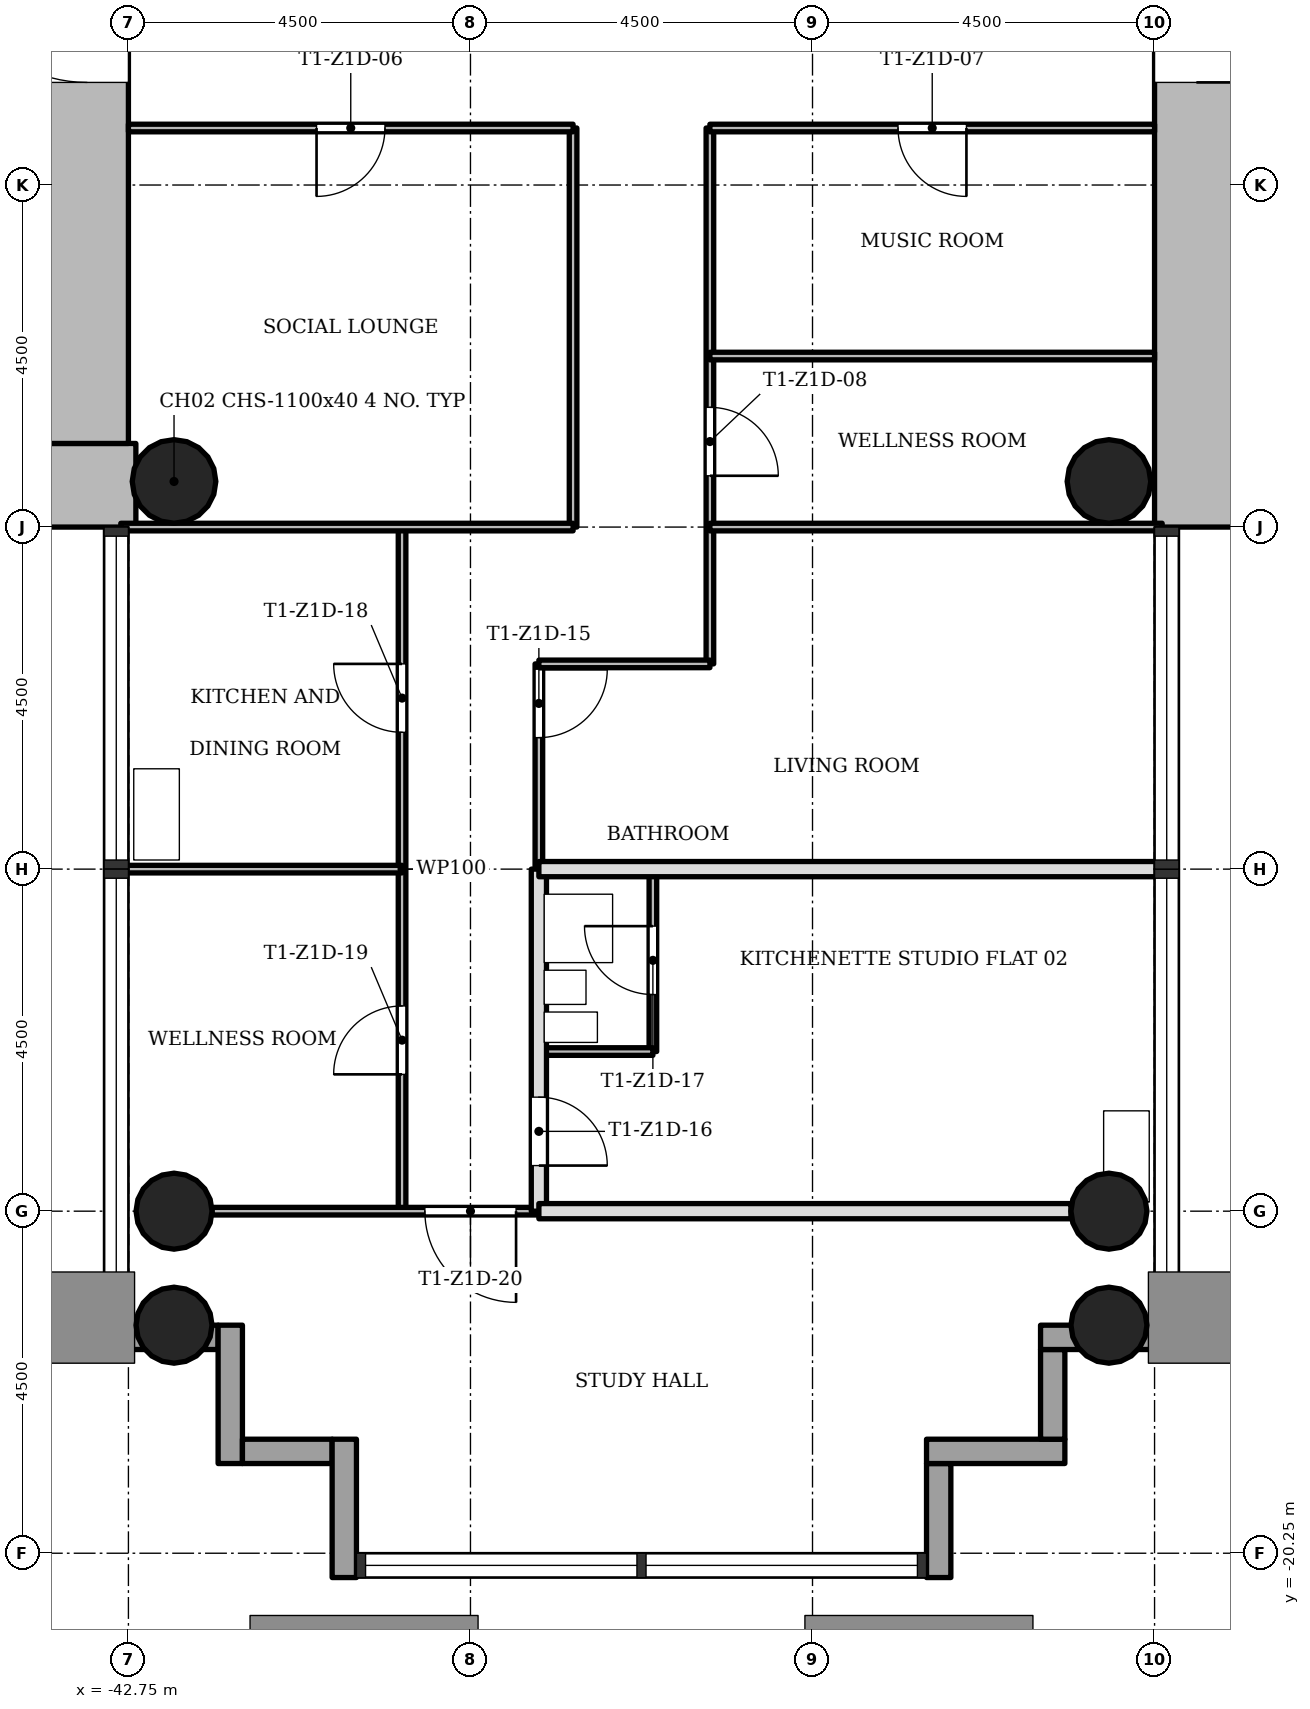
"""IFC4 building model, lengths in metres.
Left out: names, types, materials, properties, quantities, classifications, styles, units other than length and angle.
Written with IfcOpenShell. Run it as: python <this file> out.ifc"""

import sys

from ifc_helpers import new_model, si_unit, direction, frame, frame_2d, origin, origin_2d, place, context, subcontext, project, spatial, rectangle, hollow_circle, extrude, element, fill, save


model = new_model("IFC4")
c1 = context("Model", 3, precision=1e-05, world=origin(), true_north=direction((0.0, 1.0)))
c2 = subcontext(c1, "Body", "Model", "MODEL_VIEW")
j1 = project(units=[si_unit("LENGTHUNIT", "METRE"), si_unit("PLANEANGLEUNIT", "RADIAN")], contexts=[c1])
p1 = place(None, origin())
s1 = spatial("IfcSite", under=j1, at=p1, CompositionType="ELEMENT")
p2 = place(p1, origin())
s2 = spatial("IfcBuilding", under=s1, at=p2, CompositionType="ELEMENT")
p3 = place(p2, frame((0.0, 0.0, 58.5)))
s3 = spatial("IfcBuildingStorey", under=s2, at=p3, CompositionType="ELEMENT", Elevation=58.5)
p4 = place(p3, frame((-28.7, 5.65, 0.0), z_axis=(0.0, 0.0, 1.0), x_axis=(0.0, -1.0, 0.0)))
e1 = element("IfcWall", 1, at=p4, inside=s3, PredefinedType="SHEAR", context=c2, shape_type="SweptSolid", body=[
    extrude(rectangle(XDim=12.4, YDim=1.1, at=frame_2d((6.2, 0.0))), origin(), (0.0, 0.0, 1.0), 3.4),
])
p5 = place(p4, frame((4.75, 0.0, 0.0)))
e2 = element("IfcOpeningElement", 2, at=p5, cuts=e1, PredefinedType="OPENING", context=c2, shape_type="SweptSolid", body=[
    extrude(rectangle(XDim=1.8, YDim=2.1, at=frame_2d((0.9, 1.05))), frame((0.0, 0.56, 0.0), z_axis=(0.0, -1.0, 0.0), x_axis=(1.0, 0.0, 0.0)), (0.0, 0.0, 1.0), 1.12),
])
p6 = place(p3, frame((-50.65, -6.2, 0.0), z_axis=(0.0, 0.0, 1.0), x_axis=(1.0, 0.0, 0.0)))
e3 = element("IfcWall", 3, at=p6, inside=s3, PredefinedType="SHEAR", context=c2, shape_type="SweptSolid", body=[
    extrude(rectangle(XDim=7.998, YDim=1.1, at=frame_2d((3.999, 0.0))), origin(), (0.0, 0.0, 1.0), 3.4),
])
p7 = place(p3, frame((-43.3, -5.65, 0.0), z_axis=(0.0, 0.0, 1.0), x_axis=(0.0, 1.0, 0.0)))
e4 = element("IfcWall", 4, at=p7, inside=s3, PredefinedType="SHEAR", context=c2, shape_type="SweptSolid", body=[
    extrude(rectangle(XDim=12.4, YDim=1.1, at=frame_2d((6.2, 0.0))), origin(), (0.0, 0.0, 1.0), 3.4),
])
p8 = place(p7, frame((4.75, 0.0, 0.0)))
e5 = element("IfcOpeningElement", 5, at=p8, cuts=e4, PredefinedType="OPENING", context=c2, shape_type="SweptSolid", body=[
    extrude(rectangle(XDim=1.8, YDim=2.1, at=frame_2d((0.9, 1.05))), frame((0.0, 0.56, 0.0), z_axis=(0.0, -1.0, 0.0), x_axis=(1.0, 0.0, 0.0)), (0.0, 0.0, 1.0), 1.12),
])
for number, where, z_axis, x_axis in (
    (6, (-42.15, -15.75, 0.0), (0.0, 0.0, 1.0), (1.0, 0.0, 0.0)),
    (7, (-29.85, -15.75, 0.0), (0.0, 0.0, 1.0), (1.0, 0.0, 0.0)),
    (8, (-42.15, -17.25, 0.0), (0.0, 0.0, 1.0), (1.0, 0.0, 0.0)),
    (9, (-29.85, -17.25, 0.0), (0.0, 0.0, 1.0), (1.0, 0.0, 0.0)),
):
    element("IfcColumn", number, at=place(p3, frame(where, z_axis=z_axis, x_axis=x_axis)), inside=s3, PredefinedType="COLUMN", context=c2, shape_type="SweptSolid", body=[
        extrude(hollow_circle(Radius=0.5, WallThickness=0.036, at=origin_2d()), origin(), (0.0, 0.0, 1.0), 3.4),
    ])
for number, where, z_axis, x_axis in (
    (10, (-42.15, -6.15, 0.0), (0.0, 0.0, 1.0), (1.0, 0.0, 0.0)),
    (11, (-29.85, -6.15, 0.0), (0.0, 0.0, 1.0), (1.0, 0.0, 0.0)),
):
    element("IfcColumn", number, at=place(p3, frame(where, z_axis=z_axis, x_axis=x_axis)), inside=s3, PredefinedType="COLUMN", context=c2, shape_type="SweptSolid", body=[
        extrude(hollow_circle(Radius=0.55, WallThickness=0.04, at=origin_2d()), origin(), (0.0, 0.0, 1.0), 3.4),
    ])
p9 = place(p3, frame((-43.07, -17.41, -0.3), z_axis=(0.0, 0.0, 1.0), x_axis=(1.0, 0.0, 0.0)))
e12 = element("IfcWall", 12, at=p9, inside=s3, PredefinedType="STANDARD", context=c2, shape_type="SweptSolid", body=[
    extrude(rectangle(XDim=1.5, YDim=0.32, at=frame_2d((0.75, 0.0))), origin(), (0.0, 0.0, 1.0), 3.4),
])
p10 = place(p3, frame((-41.41, -17.25, -0.3), z_axis=(0.0, 0.0, 1.0), x_axis=(0.0, -1.0, 0.0)))
e13 = element("IfcWall", 13, at=p10, inside=s3, PredefinedType="STANDARD", context=c2, shape_type="SweptSolid", body=[
    extrude(rectangle(XDim=1.82, YDim=0.32, at=frame_2d((0.91, 0.0))), origin(), (0.0, 0.0, 1.0), 3.4),
])
p11 = place(p3, frame((-41.25, -18.91, -0.3), z_axis=(0.0, 0.0, 1.0), x_axis=(1.0, 0.0, 0.0)))
e14 = element("IfcWall", 14, at=p11, inside=s3, PredefinedType="STANDARD", context=c2, shape_type="SweptSolid", body=[
    extrude(rectangle(XDim=1.18, YDim=0.32, at=frame_2d((0.59, 0.0))), origin(), (0.0, 0.0, 1.0), 3.4),
])
p12 = place(p3, frame((-39.91, -18.75, -0.3), z_axis=(0.0, 0.0, 1.0), x_axis=(0.0, -1.0, 0.0)))
e15 = element("IfcWall", 15, at=p12, inside=s3, PredefinedType="STANDARD", context=c2, shape_type="SweptSolid", body=[
    extrude(rectangle(XDim=1.82, YDim=0.32, at=frame_2d((0.91, 0.0))), origin(), (0.0, 0.0, 1.0), 3.4),
])
p13 = place(p3, frame((-32.09, -20.57, -0.3), z_axis=(0.0, 0.0, 1.0), x_axis=(0.0, 1.0, 0.0)))
e16 = element("IfcWall", 16, at=p13, inside=s3, PredefinedType="STANDARD", context=c2, shape_type="SweptSolid", body=[
    extrude(rectangle(XDim=1.5, YDim=0.32, at=frame_2d((0.75, 0.0))), origin(), (0.0, 0.0, 1.0), 3.4),
])
p14 = place(p3, frame((-32.25, -18.91, -0.3), z_axis=(0.0, 0.0, 1.0), x_axis=(1.0, 0.0, 0.0)))
e17 = element("IfcWall", 17, at=p14, inside=s3, PredefinedType="STANDARD", context=c2, shape_type="SweptSolid", body=[
    extrude(rectangle(XDim=1.82, YDim=0.32, at=frame_2d((0.91, 0.0))), origin(), (0.0, 0.0, 1.0), 3.4),
])
p15 = place(p3, frame((-30.59, -18.75, -0.3), z_axis=(0.0, 0.0, 1.0), x_axis=(0.0, 1.0, 0.0)))
e18 = element("IfcWall", 18, at=p15, inside=s3, PredefinedType="STANDARD", context=c2, shape_type="SweptSolid", body=[
    extrude(rectangle(XDim=1.18, YDim=0.32, at=frame_2d((0.59, 0.0))), origin(), (0.0, 0.0, 1.0), 3.4),
])
p16 = place(p3, frame((-30.75, -17.41, -0.3), z_axis=(0.0, 0.0, 1.0), x_axis=(1.0, 0.0, 0.0)))
e19 = element("IfcWall", 19, at=p16, inside=s3, PredefinedType="STANDARD", context=c2, shape_type="SweptSolid", body=[
    extrude(rectangle(XDim=1.82, YDim=0.32, at=frame_2d((0.91, 0.0))), origin(), (0.0, 0.0, 1.0), 3.4),
])
p17 = place(p3, frame((-39.15, -15.75, 0.0), z_axis=(0.0, 0.0, 1.0), x_axis=(0.0, 1.0, 0.0)))
e20 = element("IfcWall", 20, at=p17, inside=s3, PredefinedType="PARTITIONING", context=c2, shape_type="SweptSolid", body=[
    extrude(rectangle(XDim=9.0, YDim=0.1, at=frame_2d((4.5, 0.0))), origin(), (0.0, 0.0, 1.0), 3.0),
])
p18 = place(p17, frame((6.3, 0.0, 0.0)))
e21 = element("IfcOpeningElement", 21, at=p18, cuts=e20, PredefinedType="OPENING", context=c2, shape_type="SweptSolid", body=[
    extrude(rectangle(XDim=0.9, YDim=2.1, at=frame_2d((0.45, 1.05))), frame((0.0, 0.06, 0.0), z_axis=(0.0, -1.0, 0.0), x_axis=(1.0, 0.0, 0.0)), (0.0, 0.0, 1.0), 0.12),
])
p19 = place(p17, frame((1.8, 0.0, 0.0)))
e22 = element("IfcOpeningElement", 22, at=p19, cuts=e20, PredefinedType="OPENING", context=c2, shape_type="SweptSolid", body=[
    extrude(rectangle(XDim=0.9, YDim=2.1, at=frame_2d((0.45, 1.05))), frame((0.0, 0.06, 0.0), z_axis=(0.0, -1.0, 0.0), x_axis=(1.0, 0.0, 0.0)), (0.0, 0.0, 1.0), 0.12),
])
p20 = place(p3, frame((-37.35, -11.25, 0.0), z_axis=(0.0, 0.0, 1.0), x_axis=(0.0, 1.0, 0.0)))
e23 = element("IfcWall", 23, at=p20, inside=s3, PredefinedType="PARTITIONING", context=c2, shape_type="SweptSolid", body=[
    extrude(rectangle(XDim=2.7, YDim=0.1, at=frame_2d((1.35, 0.0))), origin(), (0.0, 0.0, 1.0), 3.0),
])
p21 = place(p20, frame((1.73, 0.0, 0.0)))
e24 = element("IfcOpeningElement", 24, at=p21, cuts=e23, PredefinedType="OPENING", context=c2, shape_type="SweptSolid", body=[
    extrude(rectangle(XDim=0.9, YDim=2.1, at=frame_2d((0.45, 1.05))), frame((0.0, 0.06, 0.0), z_axis=(0.0, -1.0, 0.0), x_axis=(1.0, 0.0, 0.0)), (0.0, 0.0, 1.0), 0.12),
])
p22 = place(p3, frame((-37.35, -15.75, 0.0), z_axis=(0.0, 0.0, 1.0), x_axis=(0.0, 1.0, 0.0)))
e25 = element("IfcWall", 25, at=p22, inside=s3, PredefinedType="SOLIDWALL", context=c2, shape_type="SweptSolid", body=[
    extrude(rectangle(XDim=4.5, YDim=0.2, at=frame_2d((2.25, 0.0))), origin(), (0.0, 0.0, 1.0), 3.0),
])
p23 = place(p22, frame((0.6, 0.0, 0.0)))
e26 = element("IfcOpeningElement", 26, at=p23, cuts=e25, PredefinedType="OPENING", context=c2, shape_type="SweptSolid", body=[
    extrude(rectangle(XDim=0.9, YDim=2.1, at=frame_2d((0.45, 1.05))), frame((0.0, 0.11, 0.0), z_axis=(0.0, -1.0, 0.0), x_axis=(1.0, 0.0, 0.0)), (0.0, 0.0, 1.0), 0.22),
])
p24 = place(p3, frame((-36.9, -6.75, 0.0), z_axis=(0.0, 0.0, 1.0), x_axis=(0.0, 1.0, 0.0)))
e27 = element("IfcWall", 27, at=p24, inside=s3, PredefinedType="PARTITIONING", context=c2, shape_type="SweptSolid", body=[
    extrude(rectangle(XDim=5.25, YDim=0.1, at=frame_2d((2.625, 0.0))), origin(), (0.0, 0.0, 1.0), 3.0),
])
p25 = place(p3, frame((-35.85, -13.65, 0.0), z_axis=(0.0, 0.0, 1.0), x_axis=(0.0, 1.0, 0.0)))
e28 = element("IfcWall", 28, at=p25, inside=s3, PredefinedType="PARTITIONING", context=c2, shape_type="SweptSolid", body=[
    extrude(rectangle(XDim=2.4, YDim=0.1, at=frame_2d((1.2, 0.0))), origin(), (0.0, 0.0, 1.0), 3.0),
])
p26 = place(p25, frame((0.75, 0.0, 0.0)))
e29 = element("IfcOpeningElement", 29, at=p26, cuts=e28, PredefinedType="OPENING", context=c2, shape_type="SweptSolid", body=[
    extrude(rectangle(XDim=0.9, YDim=2.1, at=frame_2d((0.45, 1.05))), frame((0.0, 0.06, 0.0), z_axis=(0.0, -1.0, 0.0), x_axis=(1.0, 0.0, 0.0)), (0.0, 0.0, 1.0), 0.12),
])
p27 = place(p3, frame((-35.1, -8.55, 0.0), z_axis=(0.0, 0.0, 1.0), x_axis=(0.0, 1.0, 0.0)))
e30 = element("IfcWall", 30, at=p27, inside=s3, PredefinedType="PARTITIONING", context=c2, shape_type="SweptSolid", body=[
    extrude(rectangle(XDim=7.05, YDim=0.1, at=frame_2d((3.525, 0.0))), origin(), (0.0, 0.0, 1.0), 3.0),
])
p28 = place(p27, frame((2.475, 0.0, 0.0)))
e31 = element("IfcOpeningElement", 31, at=p28, cuts=e30, PredefinedType="OPENING", context=c2, shape_type="SweptSolid", body=[
    extrude(rectangle(XDim=0.9, YDim=2.1, at=frame_2d((0.45, 1.05))), frame((0.0, 0.06, 0.0), z_axis=(0.0, -1.0, 0.0), x_axis=(1.0, 0.0, 0.0)), (0.0, 0.0, 1.0), 0.12),
])
p29 = place(p3, frame((-41.65, -15.75, 0.0), z_axis=(0.0, 0.0, 1.0), x_axis=(1.0, 0.0, 0.0)))
e32 = element("IfcWall", 32, at=p29, inside=s3, PredefinedType="PARTITIONING", context=c2, shape_type="SweptSolid", body=[
    extrude(rectangle(XDim=4.3, YDim=0.1, at=frame_2d((2.15, 0.0))), origin(), (0.0, 0.0, 1.0), 3.0),
])
p30 = place(p29, frame((2.8, 0.0, 0.0)))
e33 = element("IfcOpeningElement", 33, at=p30, cuts=e32, PredefinedType="OPENING", context=c2, shape_type="SweptSolid", body=[
    extrude(rectangle(XDim=1.2, YDim=2.1, at=frame_2d((0.6, 1.05))), frame((0.0, 0.06, 0.0), z_axis=(0.0, -1.0, 0.0), x_axis=(1.0, 0.0, 0.0)), (0.0, 0.0, 1.0), 0.12),
])
p31 = place(p3, frame((-37.35, -15.75, 0.0), z_axis=(0.0, 0.0, 1.0), x_axis=(1.0, 0.0, 0.0)))
e34 = element("IfcWall", 34, at=p31, inside=s3, PredefinedType="SOLIDWALL", context=c2, shape_type="SweptSolid", body=[
    extrude(rectangle(XDim=7.0, YDim=0.2, at=frame_2d((3.5, 0.0))), origin(), (0.0, 0.0, 1.0), 3.0),
])
p32 = place(p3, frame((-37.35, -13.65, 0.0), z_axis=(0.0, 0.0, 1.0), x_axis=(1.0, 0.0, 0.0)))
e35 = element("IfcWall", 35, at=p32, inside=s3, PredefinedType="PARTITIONING", context=c2, shape_type="SweptSolid", body=[
    extrude(rectangle(XDim=1.5, YDim=0.1, at=frame_2d((0.75, 0.0))), origin(), (0.0, 0.0, 1.0), 3.0),
])
p33 = place(p3, frame((-42.85, -11.25, 0.0), z_axis=(0.0, 0.0, 1.0), x_axis=(1.0, 0.0, 0.0)))
e36 = element("IfcWall", 36, at=p33, inside=s3, PredefinedType="PARTITIONING", context=c2, shape_type="SweptSolid", body=[
    extrude(rectangle(XDim=3.7, YDim=0.1, at=frame_2d((1.85, 0.0))), origin(), (0.0, 0.0, 1.0), 3.0),
])
p34 = place(p3, frame((-37.35, -11.25, 0.0), z_axis=(0.0, 0.0, 1.0), x_axis=(1.0, 0.0, 0.0)))
e37 = element("IfcWall", 37, at=p34, inside=s3, PredefinedType="SOLIDWALL", context=c2, shape_type="SweptSolid", body=[
    extrude(rectangle(XDim=8.2, YDim=0.2, at=frame_2d((4.1, 0.0))), origin(), (0.0, 0.0, 1.0), 3.0),
])
p35 = place(p3, frame((-37.35, -8.55, 0.0), z_axis=(0.0, 0.0, 1.0), x_axis=(1.0, 0.0, 0.0)))
e38 = element("IfcWall", 38, at=p35, inside=s3, PredefinedType="PARTITIONING", context=c2, shape_type="SweptSolid", body=[
    extrude(rectangle(XDim=2.25, YDim=0.1, at=frame_2d((1.125, 0.0))), origin(), (0.0, 0.0, 1.0), 3.0),
])
for number, where, z_axis, x_axis in (
    (39, (-42.85, -6.75, 0.0), (0.0, 0.0, 1.0), (1.0, 0.0, 0.0)),
    (40, (-35.1, -6.75, 0.0), (0.0, 0.0, 1.0), (1.0, 0.0, 0.0)),
):
    element("IfcWall", number, at=place(p3, frame(where, z_axis=z_axis, x_axis=x_axis)), inside=s3, PredefinedType="PARTITIONING", context=c2, shape_type="SweptSolid", body=[
        extrude(rectangle(XDim=5.95, YDim=0.1, at=frame_2d((2.975, 0.0))), origin(), (0.0, 0.0, 1.0), 3.0),
    ])
p36 = place(p3, frame((-35.1, -4.5, 0.0), z_axis=(0.0, 0.0, 1.0), x_axis=(1.0, 0.0, 0.0)))
e41 = element("IfcWall", 41, at=p36, inside=s3, PredefinedType="PARTITIONING", context=c2, shape_type="SweptSolid", body=[
    extrude(rectangle(XDim=5.85, YDim=0.1, at=frame_2d((2.925, 0.0))), origin(), (0.0, 0.0, 1.0), 3.0),
])
p37 = place(p3, frame((-42.75, -1.5, 0.0), z_axis=(0.0, 0.0, 1.0), x_axis=(1.0, 0.0, 0.0)))
e42 = element("IfcWall", 42, at=p37, inside=s3, PredefinedType="PARTITIONING", context=c2, shape_type="SweptSolid", body=[
    extrude(rectangle(XDim=5.85, YDim=0.1, at=frame_2d((2.925, 0.0))), origin(), (0.0, 0.0, 1.0), 3.0),
])
p38 = place(p37, frame((2.475, 0.0, 0.0)))
e43 = element("IfcOpeningElement", 43, at=p38, cuts=e42, PredefinedType="OPENING", context=c2, shape_type="SweptSolid", body=[
    extrude(rectangle(XDim=0.9, YDim=2.1, at=frame_2d((0.45, 1.05))), frame((0.0, 0.06, 0.0), z_axis=(0.0, -1.0, 0.0), x_axis=(1.0, 0.0, 0.0)), (0.0, 0.0, 1.0), 0.12),
])
p39 = place(p3, frame((-35.1, -1.5, 0.0), z_axis=(0.0, 0.0, 1.0), x_axis=(1.0, 0.0, 0.0)))
e44 = element("IfcWall", 44, at=p39, inside=s3, PredefinedType="PARTITIONING", context=c2, shape_type="SweptSolid", body=[
    extrude(rectangle(XDim=5.85, YDim=0.1, at=frame_2d((2.925, 0.0))), origin(), (0.0, 0.0, 1.0), 3.0),
])
p40 = place(p39, frame((2.475, 0.0, 0.0)))
e45 = element("IfcOpeningElement", 45, at=p40, cuts=e44, PredefinedType="OPENING", context=c2, shape_type="SweptSolid", body=[
    extrude(rectangle(XDim=0.9, YDim=2.1, at=frame_2d((0.45, 1.05))), frame((0.0, 0.06, 0.0), z_axis=(0.0, -1.0, 0.0), x_axis=(1.0, 0.0, 0.0)), (0.0, 0.0, 1.0), 0.12),
])
p41 = place(p38, origin())
e46 = element("IfcDoor", 46, at=p41, inside=s3, OperationType="SINGLE_SWING_LEFT", PredefinedType="DOOR", context=c2, shape_type="SweptSolid", body=[
    extrude(rectangle(XDim=0.9, YDim=2.1, at=frame_2d((0.45, 1.05))), frame((0.0, 0.025, 0.0), z_axis=(0.0, -1.0, 0.0), x_axis=(1.0, 0.0, 0.0)), (0.0, 0.0, 1.0), 0.05),
])
fill(e43, e46)
p42 = place(p40, origin())
e47 = element("IfcDoor", 47, at=p42, inside=s3, OperationType="SINGLE_SWING_RIGHT", PredefinedType="DOOR", context=c2, shape_type="SweptSolid", body=[
    extrude(rectangle(XDim=0.9, YDim=2.1, at=frame_2d((0.45, 1.05))), frame((0.0, 0.025, 0.0), z_axis=(0.0, -1.0, 0.0), x_axis=(1.0, 0.0, 0.0)), (0.0, 0.0, 1.0), 0.05),
])
fill(e45, e47)
p43 = place(p28, origin())
e48 = element("IfcDoor", 48, at=p43, inside=s3, OperationType="SINGLE_SWING_LEFT", PredefinedType="DOOR", context=c2, shape_type="SweptSolid", body=[
    extrude(rectangle(XDim=0.9, YDim=2.1, at=frame_2d((0.45, 1.05))), frame((0.0, 0.025, 0.0), z_axis=(0.0, -1.0, 0.0), x_axis=(1.0, 0.0, 0.0)), (0.0, 0.0, 1.0), 0.05),
])
fill(e31, e48)
p44 = place(p21, origin())
e49 = element("IfcDoor", 49, at=p44, inside=s3, OperationType="SINGLE_SWING_RIGHT", PredefinedType="DOOR", context=c2, shape_type="SweptSolid", body=[
    extrude(rectangle(XDim=0.9, YDim=2.1, at=frame_2d((0.45, 1.05))), frame((0.0, 0.025, 0.0), z_axis=(0.0, -1.0, 0.0), x_axis=(1.0, 0.0, 0.0)), (0.0, 0.0, 1.0), 0.05),
])
fill(e24, e49)
p45 = place(p23, origin())
e50 = element("IfcDoor", 50, at=p45, inside=s3, OperationType="SINGLE_SWING_LEFT", PredefinedType="DOOR", context=c2, shape_type="SweptSolid", body=[
    extrude(rectangle(XDim=0.9, YDim=2.1, at=frame_2d((0.45, 1.05))), frame((0.0, 0.025, 0.0), z_axis=(0.0, -1.0, 0.0), x_axis=(1.0, 0.0, 0.0)), (0.0, 0.0, 1.0), 0.05),
])
fill(e26, e50)
p46 = place(p26, origin())
e51 = element("IfcDoor", 51, at=p46, inside=s3, OperationType="SINGLE_SWING_LEFT", PredefinedType="DOOR", context=c2, shape_type="SweptSolid", body=[
    extrude(rectangle(XDim=0.9, YDim=2.1, at=frame_2d((0.45, 1.05))), frame((0.0, 0.025, 0.0), z_axis=(0.0, -1.0, 0.0), x_axis=(1.0, 0.0, 0.0)), (0.0, 0.0, 1.0), 0.05),
])
fill(e29, e51)
p47 = place(p18, origin())
e52 = element("IfcDoor", 52, at=p47, inside=s3, OperationType="SINGLE_SWING_LEFT", PredefinedType="DOOR", context=c2, shape_type="SweptSolid", body=[
    extrude(rectangle(XDim=0.9, YDim=2.1, at=frame_2d((0.45, 1.05))), frame((0.0, 0.025, 0.0), z_axis=(0.0, -1.0, 0.0), x_axis=(1.0, 0.0, 0.0)), (0.0, 0.0, 1.0), 0.05),
])
fill(e21, e52)
p48 = place(p19, origin())
e53 = element("IfcDoor", 53, at=p48, inside=s3, OperationType="SINGLE_SWING_RIGHT", PredefinedType="DOOR", context=c2, shape_type="SweptSolid", body=[
    extrude(rectangle(XDim=0.9, YDim=2.1, at=frame_2d((0.45, 1.05))), frame((0.0, 0.025, 0.0), z_axis=(0.0, -1.0, 0.0), x_axis=(1.0, 0.0, 0.0)), (0.0, 0.0, 1.0), 0.05),
])
fill(e22, e53)
p49 = place(p30, origin())
e54 = element("IfcDoor", 54, at=p49, inside=s3, OperationType="SINGLE_SWING_RIGHT", PredefinedType="DOOR", context=c2, shape_type="SweptSolid", body=[
    extrude(rectangle(XDim=1.2, YDim=2.1, at=frame_2d((0.6, 1.05))), frame((0.0, 0.025, 0.0), z_axis=(0.0, -1.0, 0.0), x_axis=(1.0, 0.0, 0.0)), (0.0, 0.0, 1.0), 0.05),
])
fill(e33, e54)
p50 = place(p5, origin())
e55 = element("IfcDoor", 55, at=p50, inside=s3, OperationType="SINGLE_SWING_LEFT", PredefinedType="DOOR", context=c2, shape_type="SweptSolid", body=[
    extrude(rectangle(XDim=1.8, YDim=2.1, at=frame_2d((0.9, 1.05))), frame((0.0, 0.025, 0.0), z_axis=(0.0, -1.0, 0.0), x_axis=(1.0, 0.0, 0.0)), (0.0, 0.0, 1.0), 0.05),
])
fill(e2, e55)
p51 = place(p8, origin())
e56 = element("IfcDoor", 56, at=p51, inside=s3, OperationType="SINGLE_SWING_LEFT", PredefinedType="DOOR", context=c2, shape_type="SweptSolid", body=[
    extrude(rectangle(XDim=1.8, YDim=2.1, at=frame_2d((0.9, 1.05))), frame((0.0, 0.025, 0.0), z_axis=(0.0, -1.0, 0.0), x_axis=(1.0, 0.0, 0.0)), (0.0, 0.0, 1.0), 0.05),
])
fill(e5, e56)
save(model, sys.argv[1])
